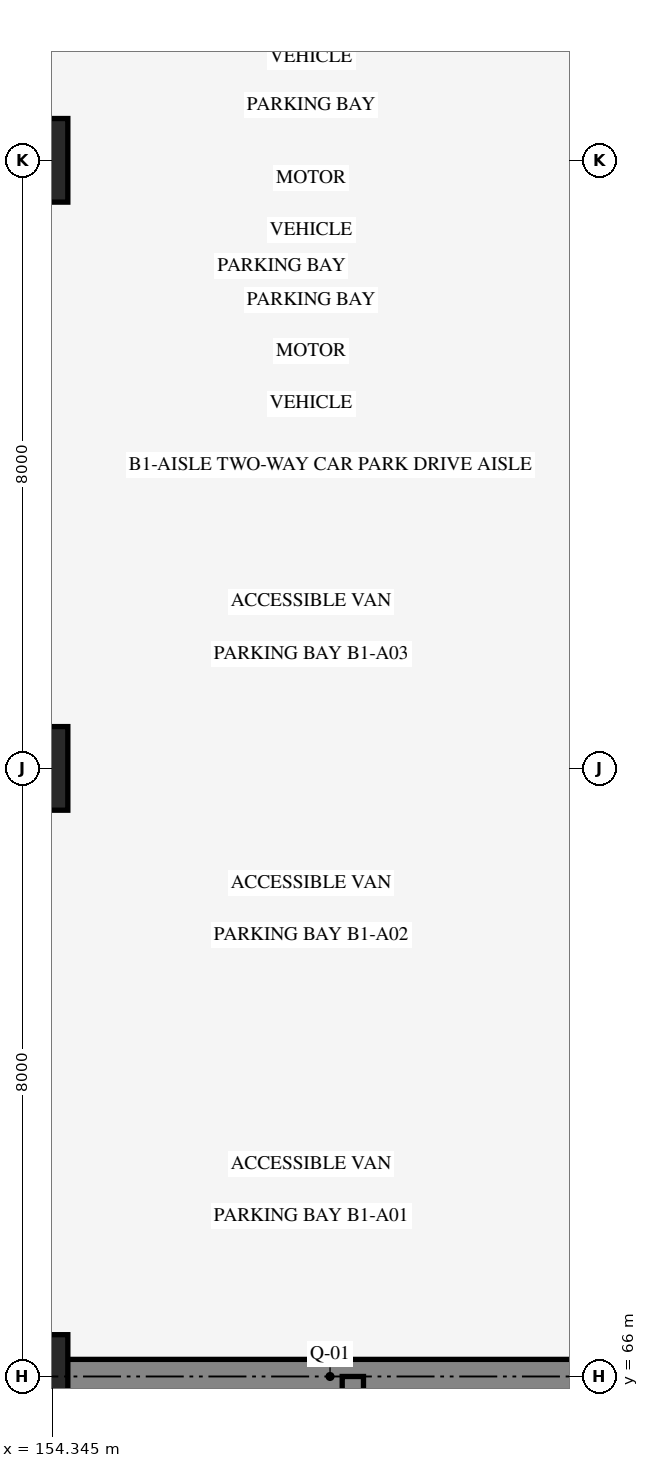
"""IFC4 building model, lengths in metres.
Left out: names, types, materials, properties, quantities, classifications, styles, units other than length and angle.
Written with IfcOpenShell. Run it as: python <this file> out.ifc"""

import sys

from ifc_helpers import new_model, si_unit, direction, frame, frame_2d, origin, origin_2d, place, context, subcontext, project, spatial, rectangle, extrude, element, save


model = new_model("IFC4")
c1 = context("Model", 3, precision=1e-05, world=origin(), true_north=direction((0.0, 1.0)))
c2 = subcontext(c1, "Body", "Model", "MODEL_VIEW")
j1 = project(units=[si_unit("LENGTHUNIT", "METRE"), si_unit("PLANEANGLEUNIT", "RADIAN")], contexts=[c1])
p1 = place(None, origin())
s1 = spatial("IfcSite", under=j1, at=p1, CompositionType="ELEMENT")
p2 = place(p1, origin())
s2 = spatial("IfcBuilding", under=s1, at=p2, CompositionType="ELEMENT")
p3 = place(p2, frame((0.0, 0.0, -4.5)))
s3 = spatial("IfcBuildingStorey", under=s2, at=p3, CompositionType="ELEMENT", Elevation=-4.5)
p4 = place(p3, frame((162.0, 66.0, 0.0), z_axis=(0.0, 0.0, 1.0), x_axis=(-1.0, 0.0, 0.0)))
e1 = element("IfcWall", 1, at=p4, inside=s3, PredefinedType="SHEAR", context=c2, shape_type="SweptSolid", body=[
    extrude(rectangle(XDim=8.0, YDim=0.45, at=frame_2d((4.0, 0.0))), origin(), (0.0, 0.0, 1.0), 4.22),
])
p5 = place(p3, frame((158.3, 58.0, 0.0), z_axis=(0.0, 0.0, 1.0), x_axis=(0.0, 1.0, 0.0)))
e2 = element("IfcWall", 2, at=p5, inside=s3, PredefinedType="SHEAR", context=c2, shape_type="SweptSolid", body=[
    extrude(rectangle(XDim=8.0, YDim=0.28, at=frame_2d((4.0, 0.0))), origin(), (0.0, 0.0, 1.0), 4.22),
])
for number, where, z_axis, x_axis in (
    (3, (154.0, 66.0, 0.0), (0.0, 0.0, 1.0), (1.0, 0.0, 0.0)),
    (4, (154.0, 74.0, 0.0), (0.0, 0.0, 1.0), (1.0, 0.0, 0.0)),
    (5, (154.0, 82.0, 0.0), (0.0, 0.0, 1.0), (1.0, 0.0, 0.0)),
):
    element("IfcColumn", number, at=place(p3, frame(where, z_axis=z_axis, x_axis=x_axis)), inside=s3, PredefinedType="COLUMN", context=c2, shape_type="SweptSolid", body=[
        extrude(rectangle(XDim=1.1, YDim=1.1, at=origin_2d()), origin(), (0.0, 0.0, 1.0), 4.5),
    ])
save(model, sys.argv[1])
